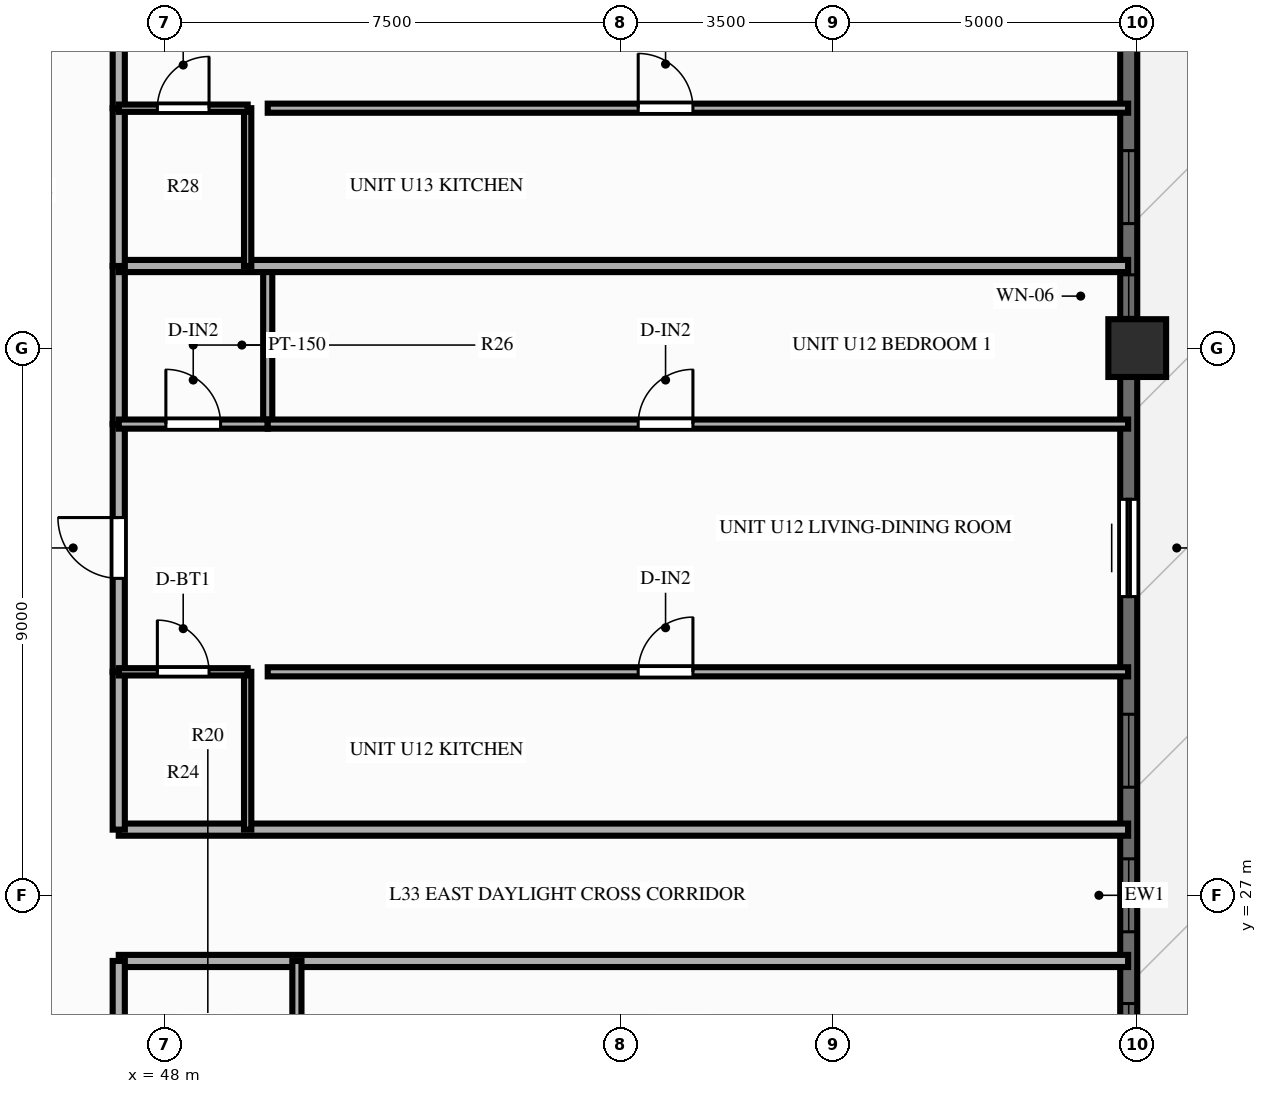
"""IFC4 building model, lengths in metres.
Left out: names, types, materials, properties, quantities, classifications, styles, units other than length and angle.
Written with IfcOpenShell. Run it as: python <this file> out.ifc"""

import sys

from ifc_helpers import new_model, si_unit, direction, frame, frame_2d, origin, origin_2d, place, context, subcontext, project, spatial, rectangle, extrude, source, transform, mapped, element, fill, save


model = new_model("IFC4")
c1 = context("Model", 3, precision=1e-05, world=origin(), true_north=direction((0.0, 1.0)))
c2 = subcontext(c1, "Body", "Model", "MODEL_VIEW")
j1 = project(units=[si_unit("LENGTHUNIT", "METRE"), si_unit("PLANEANGLEUNIT", "RADIAN")], contexts=[c1])
p1 = place(None, origin())
s1 = spatial("IfcSite", under=j1, at=p1, CompositionType="ELEMENT")
p2 = place(p1, origin())
s2 = spatial("IfcBuilding", under=s1, at=p2, CompositionType="ELEMENT")
p3 = place(p2, frame((0.0, 0.0, 104.85)))
s3 = spatial("IfcBuildingStorey", under=s2, at=p3, CompositionType="ELEMENT", Elevation=104.85)
m1 = source(origin(), c2, "Body", "SweptSolid", [
    extrude(rectangle(XDim=0.95, YDim=0.95, at=origin_2d()), origin(), (0.0, 0.0, 1.0), 3.0),
])
p4 = place(p3, frame((64.0, 36.0, 0.0), z_axis=(0.0, 0.0, 1.0), x_axis=(1.0, 0.0, 0.0)))
e1 = element("IfcColumn", 1, at=p4, inside=s3, PredefinedType="COLUMN", context=c2, shape_type="MappedRepresentation", body=[
    mapped(m1, transform((0.0, 0.0, 0.0), scale=1.0)),
])
p5 = place(p3, frame((63.86, 7.2, 0.0), z_axis=(0.0, 0.0, 1.0), x_axis=(0.0, 1.0, 0.0)))
e2 = element("IfcWall", 2, at=p5, inside=s3, PredefinedType="SOLIDWALL", context=c2, shape_type="SweptSolid", body=[
    extrude(rectangle(XDim=39.6, YDim=0.28, at=frame_2d((19.8, 0.0))), origin(), (0.0, 0.0, 1.0), 2.28),
])
p6 = place(p5, frame((0.945, 0.0, 0.25)))
e3 = element("IfcOpeningElement", 3, at=p6, cuts=e2, PredefinedType="OPENING", context=c2, shape_type="SweptSolid", body=[
    extrude(rectangle(XDim=1.2, YDim=1.5, at=frame_2d((0.6, 0.75))), frame((0.0, 0.152, 0.0), z_axis=(0.0, -1.0, 0.0), x_axis=(1.0, 0.0, 0.0)), (0.0, 0.0, 1.0), 0.304),
])
p7 = place(p5, frame((4.213, 0.0, 0.25)))
e4 = element("IfcOpeningElement", 4, at=p7, cuts=e2, PredefinedType="OPENING", context=c2, shape_type="SweptSolid", body=[
    extrude(rectangle(XDim=1.2, YDim=1.5, at=frame_2d((0.6, 0.75))), frame((0.0, 0.152, 0.0), z_axis=(0.0, -1.0, 0.0), x_axis=(1.0, 0.0, 0.0)), (0.0, 0.0, 1.0), 0.304),
])
p8 = place(p5, frame((7.55, 0.0, 0.25)))
e5 = element("IfcOpeningElement", 5, at=p8, cuts=e2, PredefinedType="OPENING", context=c2, shape_type="SweptSolid", body=[
    extrude(rectangle(XDim=1.2, YDim=1.5, at=frame_2d((0.6, 0.75))), frame((0.0, 0.152, 0.0), z_axis=(0.0, -1.0, 0.0), x_axis=(1.0, 0.0, 0.0)), (0.0, 0.0, 1.0), 0.304),
])
p9 = place(p5, frame((13.483, 0.0, 0.25)))
e6 = element("IfcOpeningElement", 6, at=p9, cuts=e2, PredefinedType="OPENING", context=c2, shape_type="SweptSolid", body=[
    extrude(rectangle(XDim=1.2, YDim=1.5, at=frame_2d((0.6, 0.75))), frame((0.0, 0.152, 0.0), z_axis=(0.0, -1.0, 0.0), x_axis=(1.0, 0.0, 0.0)), (0.0, 0.0, 1.0), 0.304),
])
p10 = place(p5, frame((16.82, 0.0, 0.25)))
e7 = element("IfcOpeningElement", 7, at=p10, cuts=e2, PredefinedType="OPENING", context=c2, shape_type="SweptSolid", body=[
    extrude(rectangle(XDim=1.2, YDim=1.5, at=frame_2d((0.6, 0.75))), frame((0.0, 0.152, 0.0), z_axis=(0.0, -1.0, 0.0), x_axis=(1.0, 0.0, 0.0)), (0.0, 0.0, 1.0), 0.304),
])
p11 = place(p5, frame((19.2, 0.0, 0.25)))
e8 = element("IfcOpeningElement", 8, at=p11, cuts=e2, PredefinedType="OPENING", context=c2, shape_type="SweptSolid", body=[
    extrude(rectangle(XDim=1.2, YDim=1.5, at=frame_2d((0.6, 0.75))), frame((0.0, 0.152, 0.0), z_axis=(0.0, -1.0, 0.0), x_axis=(1.0, 0.0, 0.0)), (0.0, 0.0, 1.0), 0.304),
])
p12 = place(p5, frame((21.578, 0.0, 0.25)))
e9 = element("IfcOpeningElement", 9, at=p12, cuts=e2, PredefinedType="OPENING", context=c2, shape_type="SweptSolid", body=[
    extrude(rectangle(XDim=1.2, YDim=1.5, at=frame_2d((0.6, 0.75))), frame((0.0, 0.152, 0.0), z_axis=(0.0, -1.0, 0.0), x_axis=(1.0, 0.0, 0.0)), (0.0, 0.0, 1.0), 0.304),
])
p13 = place(p5, frame((26.313, 0.0, 0.0), z_axis=(0.0, 0.0, 1.0), x_axis=(-1.0, 0.0, 0.0)))
e10 = element("IfcOpeningElement", 10, at=p13, cuts=e2, PredefinedType="OPENING", context=c2, shape_type="SweptSolid", body=[
    extrude(rectangle(XDim=1.6, YDim=2.15, at=frame_2d((0.8, 1.075))), frame((0.0, 0.152, 0.0), z_axis=(0.0, -1.0, 0.0), x_axis=(1.0, 0.0, 0.0)), (0.0, 0.0, 1.0), 0.304),
])
p14 = place(p5, frame((29.305, 0.0, 0.25)))
e11 = element("IfcOpeningElement", 11, at=p14, cuts=e2, PredefinedType="OPENING", context=c2, shape_type="SweptSolid", body=[
    extrude(rectangle(XDim=0.7, YDim=1.5, at=frame_2d((0.35, 0.75))), frame((0.0, 0.152, 0.0), z_axis=(0.0, -1.0, 0.0), x_axis=(1.0, 0.0, 0.0)), (0.0, 0.0, 1.0), 0.304),
])
p15 = place(p5, frame((30.848, 0.0, 0.25)))
e12 = element("IfcOpeningElement", 12, at=p15, cuts=e2, PredefinedType="OPENING", context=c2, shape_type="SweptSolid", body=[
    extrude(rectangle(XDim=1.2, YDim=1.5, at=frame_2d((0.6, 0.75))), frame((0.0, 0.152, 0.0), z_axis=(0.0, -1.0, 0.0), x_axis=(1.0, 0.0, 0.0)), (0.0, 0.0, 1.0), 0.304),
])
p16 = place(p5, frame((34.183, 0.0, 0.25)))
e13 = element("IfcOpeningElement", 13, at=p16, cuts=e2, PredefinedType="OPENING", context=c2, shape_type="SweptSolid", body=[
    extrude(rectangle(XDim=1.2, YDim=1.5, at=frame_2d((0.6, 0.75))), frame((0.0, 0.152, 0.0), z_axis=(0.0, -1.0, 0.0), x_axis=(1.0, 0.0, 0.0)), (0.0, 0.0, 1.0), 0.304),
])
p17 = place(p5, frame((37.452, 0.0, 0.25)))
e14 = element("IfcOpeningElement", 14, at=p17, cuts=e2, PredefinedType="OPENING", context=c2, shape_type="SweptSolid", body=[
    extrude(rectangle(XDim=1.2, YDim=1.5, at=frame_2d((0.6, 0.75))), frame((0.0, 0.152, 0.0), z_axis=(0.0, -1.0, 0.0), x_axis=(1.0, 0.0, 0.0)), (0.0, 0.0, 1.0), 0.304),
])
p18 = place(p3, frame((47.25, 25.92, 0.0), z_axis=(0.0, 0.0, 1.0), x_axis=(1.0, 0.0, 0.0)))
e15 = element("IfcWall", 15, at=p18, inside=s3, PredefinedType="PARTITIONING", context=c2, shape_type="SweptSolid", body=[
    extrude(rectangle(XDim=16.6, YDim=0.2, at=frame_2d((8.3, 0.0))), origin(), (0.0, 0.0, 1.0), 2.79),
])
p19 = place(p3, frame((47.25, 23.32, 0.0), z_axis=(0.0, 0.0, 1.0), x_axis=(0.0, 1.0, 0.0)))
e16 = element("IfcWall", 16, at=p19, inside=s3, PredefinedType="PARTITIONING", context=c2, shape_type="SweptSolid", body=[
    extrude(rectangle(XDim=2.6, YDim=0.2, at=frame_2d((1.3, 0.0))), origin(), (0.0, 0.0, 1.0), 2.79),
])
p20 = place(p3, frame((50.18, 23.32, 0.0), z_axis=(0.0, 0.0, 1.0), x_axis=(0.0, 1.0, 0.0)))
e17 = element("IfcWall", 17, at=p20, inside=s3, PredefinedType="PARTITIONING", context=c2, shape_type="SweptSolid", body=[
    extrude(rectangle(XDim=2.6, YDim=0.15, at=frame_2d((1.3, 0.0))), origin(), (0.0, 0.0, 1.0), 2.79),
])
p21 = place(p3, frame((47.25, 28.08, 0.0), z_axis=(0.0, 0.0, 1.0), x_axis=(1.0, 0.0, 0.0)))
e18 = element("IfcWall", 18, at=p21, inside=s3, PredefinedType="PARTITIONING", context=c2, shape_type="SweptSolid", body=[
    extrude(rectangle(XDim=16.6, YDim=0.2, at=frame_2d((8.3, 0.0))), origin(), (0.0, 0.0, 1.0), 2.79),
])
p22 = place(p3, frame((47.25, 28.08, 0.0), z_axis=(0.0, 0.0, 1.0), x_axis=(0.0, 1.0, 0.0)))
e19 = element("IfcWall", 19, at=p22, inside=s3, PredefinedType="PARTITIONING", context=c2, shape_type="SweptSolid", body=[
    extrude(rectangle(XDim=2.595, YDim=0.2, at=frame_2d((1.298, 0.0))), origin(), (0.0, 0.0, 1.0), 2.79),
])
p23 = place(p3, frame((47.25, 30.676, 0.0), z_axis=(0.0, 0.0, 1.0), x_axis=(0.0, 1.0, 0.0)))
e20 = element("IfcWall", 20, at=p23, inside=s3, PredefinedType="PARTITIONING", context=c2, shape_type="SweptSolid", body=[
    extrude(rectangle(XDim=4.074, YDim=0.2, at=frame_2d((2.037, 0.0))), origin(), (0.0, 0.0, 1.0), 2.79),
])
p24 = place(p23, frame((1.537, 0.0, 0.0)))
e21 = element("IfcOpeningElement", 21, at=p24, cuts=e20, PredefinedType="OPENING", context=c2, shape_type="SweptSolid", body=[
    extrude(rectangle(XDim=1.0, YDim=2.15, at=frame_2d((0.5, 1.075))), frame((0.0, 0.112, 0.0), z_axis=(0.0, -1.0, 0.0), x_axis=(1.0, 0.0, 0.0)), (0.0, 0.0, 1.0), 0.224),
])
p25 = place(p3, frame((47.25, 34.75, 0.0), z_axis=(0.0, 0.0, 1.0), x_axis=(0.0, 1.0, 0.0)))
e22 = element("IfcWall", 22, at=p25, inside=s3, PredefinedType="PARTITIONING", context=c2, shape_type="SweptSolid", body=[
    extrude(rectangle(XDim=2.6, YDim=0.2, at=frame_2d((1.3, 0.0))), origin(), (0.0, 0.0, 1.0), 2.79),
])
p26 = place(p3, frame((49.37, 28.08, 0.0), z_axis=(0.0, 0.0, 1.0), x_axis=(0.0, 1.0, 0.0)))
e23 = element("IfcWall", 23, at=p26, inside=s3, PredefinedType="PARTITIONING", context=c2, shape_type="SweptSolid", body=[
    extrude(rectangle(XDim=2.595, YDim=0.12, at=frame_2d((1.298, 0.0))), origin(), (0.0, 0.0, 1.0), 2.79),
])
p27 = place(p3, frame((49.7, 34.75, 0.0), z_axis=(0.0, 0.0, 1.0), x_axis=(0.0, 1.0, 0.0)))
e24 = element("IfcWall", 24, at=p27, inside=s3, PredefinedType="PARTITIONING", context=c2, shape_type="SweptSolid", body=[
    extrude(rectangle(XDim=2.6, YDim=0.15, at=frame_2d((1.3, 0.0))), origin(), (0.0, 0.0, 1.0), 2.79),
])
p28 = place(p3, frame((47.25, 30.676, 0.0), z_axis=(0.0, 0.0, 1.0), x_axis=(1.0, 0.0, 0.0)))
e25 = element("IfcWall", 25, at=p28, inside=s3, PredefinedType="PARTITIONING", context=c2, shape_type="SweptSolid", body=[
    extrude(rectangle(XDim=2.12, YDim=0.12, at=frame_2d((1.06, 0.0))), origin(), (0.0, 0.0, 1.0), 2.79),
])
p29 = place(p28, frame((0.635, 0.0, 0.0)))
e26 = element("IfcOpeningElement", 26, at=p29, cuts=e25, PredefinedType="OPENING", context=c2, shape_type="SweptSolid", body=[
    extrude(rectangle(XDim=0.85, YDim=2.05, at=frame_2d((0.425, 1.025))), frame((0.0, 0.072, 0.0), z_axis=(0.0, -1.0, 0.0), x_axis=(1.0, 0.0, 0.0)), (0.0, 0.0, 1.0), 0.144),
])
p30 = place(p3, frame((49.7, 30.676, 0.0), z_axis=(0.0, 0.0, 1.0), x_axis=(1.0, 0.0, 0.0)))
e27 = element("IfcWall", 27, at=p30, inside=s3, PredefinedType="PARTITIONING", context=c2, shape_type="SweptSolid", body=[
    extrude(rectangle(XDim=14.15, YDim=0.15, at=frame_2d((7.075, 0.0))), origin(), (0.0, 0.0, 1.0), 2.79),
])
p31 = place(p30, frame((6.093, 0.0, 0.0)))
e28 = element("IfcOpeningElement", 28, at=p31, cuts=e27, PredefinedType="OPENING", context=c2, shape_type="SweptSolid", body=[
    extrude(rectangle(XDim=0.9, YDim=2.1, at=frame_2d((0.45, 1.05))), frame((0.0, 0.087, 0.0), z_axis=(0.0, -1.0, 0.0), x_axis=(1.0, 0.0, 0.0)), (0.0, 0.0, 1.0), 0.174),
])
p32 = place(p3, frame((47.25, 34.75, 0.0), z_axis=(0.0, 0.0, 1.0), x_axis=(1.0, 0.0, 0.0)))
e29 = element("IfcWall", 29, at=p32, inside=s3, PredefinedType="PARTITIONING", context=c2, shape_type="SweptSolid", body=[
    extrude(rectangle(XDim=2.45, YDim=0.15, at=frame_2d((1.225, 0.0))), origin(), (0.0, 0.0, 1.0), 2.79),
])
p33 = place(p32, frame((0.775, 0.0, 0.0)))
e30 = element("IfcOpeningElement", 30, at=p33, cuts=e29, PredefinedType="OPENING", context=c2, shape_type="SweptSolid", body=[
    extrude(rectangle(XDim=0.9, YDim=2.1, at=frame_2d((0.45, 1.05))), frame((0.0, 0.087, 0.0), z_axis=(0.0, -1.0, 0.0), x_axis=(1.0, 0.0, 0.0)), (0.0, 0.0, 1.0), 0.174),
])
p34 = place(p3, frame((49.7, 34.75, 0.0), z_axis=(0.0, 0.0, 1.0), x_axis=(1.0, 0.0, 0.0)))
e31 = element("IfcWall", 31, at=p34, inside=s3, PredefinedType="PARTITIONING", context=c2, shape_type="SweptSolid", body=[
    extrude(rectangle(XDim=14.15, YDim=0.15, at=frame_2d((7.075, 0.0))), origin(), (0.0, 0.0, 1.0), 2.79),
])
p35 = place(p34, frame((6.093, 0.0, 0.0)))
e32 = element("IfcOpeningElement", 32, at=p35, cuts=e31, PredefinedType="OPENING", context=c2, shape_type="SweptSolid", body=[
    extrude(rectangle(XDim=0.9, YDim=2.1, at=frame_2d((0.45, 1.05))), frame((0.0, 0.087, 0.0), z_axis=(0.0, -1.0, 0.0), x_axis=(1.0, 0.0, 0.0)), (0.0, 0.0, 1.0), 0.174),
])
p36 = place(p3, frame((47.25, 37.35, 0.0), z_axis=(0.0, 0.0, 1.0), x_axis=(1.0, 0.0, 0.0)))
e33 = element("IfcWall", 33, at=p36, inside=s3, PredefinedType="PARTITIONING", context=c2, shape_type="SweptSolid", body=[
    extrude(rectangle(XDim=16.6, YDim=0.2, at=frame_2d((8.3, 0.0))), origin(), (0.0, 0.0, 1.0), 2.79),
])
p37 = place(p3, frame((47.25, 37.35, 0.0), z_axis=(0.0, 0.0, 1.0), x_axis=(0.0, 1.0, 0.0)))
e34 = element("IfcWall", 34, at=p37, inside=s3, PredefinedType="PARTITIONING", context=c2, shape_type="SweptSolid", body=[
    extrude(rectangle(XDim=2.595, YDim=0.2, at=frame_2d((1.298, 0.0))), origin(), (0.0, 0.0, 1.0), 2.79),
])
p38 = place(p3, frame((47.25, 39.946, 0.0), z_axis=(0.0, 0.0, 1.0), x_axis=(0.0, 1.0, 0.0)))
e35 = element("IfcWall", 35, at=p38, inside=s3, PredefinedType="PARTITIONING", context=c2, shape_type="SweptSolid", body=[
    extrude(rectangle(XDim=4.074, YDim=0.2, at=frame_2d((2.037, 0.0))), origin(), (0.0, 0.0, 1.0), 2.79),
])
p39 = place(p38, frame((1.537, 0.0, 0.0)))
e36 = element("IfcOpeningElement", 36, at=p39, cuts=e35, PredefinedType="OPENING", context=c2, shape_type="SweptSolid", body=[
    extrude(rectangle(XDim=1.0, YDim=2.15, at=frame_2d((0.5, 1.075))), frame((0.0, 0.112, 0.0), z_axis=(0.0, -1.0, 0.0), x_axis=(1.0, 0.0, 0.0)), (0.0, 0.0, 1.0), 0.224),
])
p40 = place(p3, frame((49.37, 37.35, 0.0), z_axis=(0.0, 0.0, 1.0), x_axis=(0.0, 1.0, 0.0)))
e37 = element("IfcWall", 37, at=p40, inside=s3, PredefinedType="PARTITIONING", context=c2, shape_type="SweptSolid", body=[
    extrude(rectangle(XDim=2.595, YDim=0.12, at=frame_2d((1.298, 0.0))), origin(), (0.0, 0.0, 1.0), 2.79),
])
p41 = place(p3, frame((47.25, 39.946, 0.0), z_axis=(0.0, 0.0, 1.0), x_axis=(1.0, 0.0, 0.0)))
e38 = element("IfcWall", 38, at=p41, inside=s3, PredefinedType="PARTITIONING", context=c2, shape_type="SweptSolid", body=[
    extrude(rectangle(XDim=2.12, YDim=0.12, at=frame_2d((1.06, 0.0))), origin(), (0.0, 0.0, 1.0), 2.79),
])
p42 = place(p41, frame((0.635, 0.0, 0.0)))
e39 = element("IfcOpeningElement", 39, at=p42, cuts=e38, PredefinedType="OPENING", context=c2, shape_type="SweptSolid", body=[
    extrude(rectangle(XDim=0.85, YDim=2.05, at=frame_2d((0.425, 1.025))), frame((0.0, 0.072, 0.0), z_axis=(0.0, -1.0, 0.0), x_axis=(1.0, 0.0, 0.0)), (0.0, 0.0, 1.0), 0.144),
])
p43 = place(p3, frame((49.7, 39.946, 0.0), z_axis=(0.0, 0.0, 1.0), x_axis=(1.0, 0.0, 0.0)))
e40 = element("IfcWall", 40, at=p43, inside=s3, PredefinedType="PARTITIONING", context=c2, shape_type="SweptSolid", body=[
    extrude(rectangle(XDim=14.15, YDim=0.15, at=frame_2d((7.075, 0.0))), origin(), (0.0, 0.0, 1.0), 2.79),
])
p44 = place(p43, frame((6.093, 0.0, 0.0)))
e41 = element("IfcOpeningElement", 41, at=p44, cuts=e40, PredefinedType="OPENING", context=c2, shape_type="SweptSolid", body=[
    extrude(rectangle(XDim=0.9, YDim=2.1, at=frame_2d((0.45, 1.05))), frame((0.0, 0.087, 0.0), z_axis=(0.0, -1.0, 0.0), x_axis=(1.0, 0.0, 0.0)), (0.0, 0.0, 1.0), 0.174),
])
m2 = source(origin(), c2, "Body", "SweptSolid", [
    extrude(rectangle(XDim=1.2, YDim=1.5, at=frame_2d((0.6, 0.75))), frame((0.0, 0.03, 0.0), z_axis=(0.0, -1.0, 0.0), x_axis=(1.0, 0.0, 0.0)), (0.0, 0.0, 1.0), 0.06),
])
p45 = place(p10, origin())
e42 = element("IfcWindow", 42, at=p45, inside=s3, PartitioningType="SINGLE_PANEL", PredefinedType="WINDOW", context=c2, shape_type="MappedRepresentation", body=[
    mapped(m2, transform((0.0, 0.0, 0.0), scale=1.0)),
])
fill(e7, e42)
p46 = place(p11, origin())
e43 = element("IfcWindow", 43, at=p46, inside=s3, PartitioningType="SINGLE_PANEL", PredefinedType="WINDOW", context=c2, shape_type="MappedRepresentation", body=[
    mapped(m2, transform((0.0, 0.0, 0.0), scale=1.0)),
])
fill(e8, e43)
p47 = place(p12, origin())
e44 = element("IfcWindow", 44, at=p47, inside=s3, PartitioningType="SINGLE_PANEL", PredefinedType="WINDOW", context=c2, shape_type="MappedRepresentation", body=[
    mapped(m2, transform((0.0, 0.0, 0.0), scale=1.0)),
])
fill(e9, e44)
m3 = source(origin(), c2, "Body", "SweptSolid", [
    extrude(rectangle(XDim=1.6, YDim=2.15, at=frame_2d((0.8, 1.075))), frame((0.0, 0.025, 0.0), z_axis=(0.0, -1.0, 0.0), x_axis=(1.0, 0.0, 0.0)), (0.0, 0.0, 1.0), 0.05),
])
p48 = place(p13, origin())
e45 = element("IfcDoor", 45, at=p48, inside=s3, OperationType="SLIDING_TO_LEFT", PredefinedType="DOOR", context=c2, shape_type="MappedRepresentation", body=[
    mapped(m3, transform((0.0, 0.0, 0.0), scale=1.0)),
])
fill(e10, e45)
m4 = source(origin(), c2, "Body", "SweptSolid", [
    extrude(rectangle(XDim=0.7, YDim=1.5, at=frame_2d((0.35, 0.75))), frame((0.0, 0.03, 0.0), z_axis=(0.0, -1.0, 0.0), x_axis=(1.0, 0.0, 0.0)), (0.0, 0.0, 1.0), 0.06),
])
p49 = place(p14, origin())
e46 = element("IfcWindow", 46, at=p49, inside=s3, PartitioningType="SINGLE_PANEL", PredefinedType="WINDOW", context=c2, shape_type="MappedRepresentation", body=[
    mapped(m4, transform((0.0, 0.0, 0.0), scale=1.0)),
])
fill(e11, e46)
p50 = place(p15, origin())
e47 = element("IfcWindow", 47, at=p50, inside=s3, PartitioningType="SINGLE_PANEL", PredefinedType="WINDOW", context=c2, shape_type="MappedRepresentation", body=[
    mapped(m2, transform((0.0, 0.0, 0.0), scale=1.0)),
])
fill(e12, e47)
m5 = source(origin(), c2, "Body", "SweptSolid", [
    extrude(rectangle(XDim=1.0, YDim=2.15, at=frame_2d((0.5, 1.075))), frame((0.0, 0.025, 0.0), z_axis=(0.0, -1.0, 0.0), x_axis=(1.0, 0.0, 0.0)), (0.0, 0.0, 1.0), 0.05),
])
p51 = place(p24, origin())
e48 = element("IfcDoor", 48, at=p51, inside=s3, OperationType="SINGLE_SWING_RIGHT", PredefinedType="DOOR", context=c2, shape_type="MappedRepresentation", body=[
    mapped(m5, transform((0.0, 0.0, 0.0), scale=1.0)),
])
fill(e21, e48)
m6 = source(origin(), c2, "Body", "SweptSolid", [
    extrude(rectangle(XDim=0.85, YDim=2.05, at=frame_2d((0.425, 1.025))), frame((0.0, 0.025, 0.0), z_axis=(0.0, -1.0, 0.0), x_axis=(1.0, 0.0, 0.0)), (0.0, 0.0, 1.0), 0.05),
])
p52 = place(p29, origin())
e49 = element("IfcDoor", 49, at=p52, inside=s3, OperationType="SINGLE_SWING_LEFT", PredefinedType="DOOR", context=c2, shape_type="MappedRepresentation", body=[
    mapped(m6, transform((0.0, 0.0, 0.0), scale=1.0)),
])
fill(e26, e49)
m7 = source(origin(), c2, "Body", "SweptSolid", [
    extrude(rectangle(XDim=0.9, YDim=2.1, at=frame_2d((0.45, 1.05))), frame((0.0, 0.025, 0.0), z_axis=(0.0, -1.0, 0.0), x_axis=(1.0, 0.0, 0.0)), (0.0, 0.0, 1.0), 0.05),
])
p53 = place(p31, origin())
e50 = element("IfcDoor", 50, at=p53, inside=s3, OperationType="SINGLE_SWING_RIGHT", PredefinedType="DOOR", context=c2, shape_type="MappedRepresentation", body=[
    mapped(m7, transform((0.0, 0.0, 0.0), scale=1.0)),
])
fill(e28, e50)
p54 = place(p33, origin())
e51 = element("IfcDoor", 51, at=p54, inside=s3, OperationType="SINGLE_SWING_LEFT", PredefinedType="DOOR", context=c2, shape_type="MappedRepresentation", body=[
    mapped(m7, transform((0.0, 0.0, 0.0), scale=1.0)),
])
fill(e30, e51)
p55 = place(p35, origin())
e52 = element("IfcDoor", 52, at=p55, inside=s3, OperationType="SINGLE_SWING_RIGHT", PredefinedType="DOOR", context=c2, shape_type="MappedRepresentation", body=[
    mapped(m7, transform((0.0, 0.0, 0.0), scale=1.0)),
])
fill(e32, e52)
p56 = place(p42, origin())
e53 = element("IfcDoor", 53, at=p56, inside=s3, OperationType="SINGLE_SWING_RIGHT", PredefinedType="DOOR", context=c2, shape_type="MappedRepresentation", body=[
    mapped(m6, transform((0.0, 0.0, 0.0), scale=1.0)),
])
fill(e39, e53)
p57 = place(p44, origin())
e54 = element("IfcDoor", 54, at=p57, inside=s3, OperationType="SINGLE_SWING_LEFT", PredefinedType="DOOR", context=c2, shape_type="MappedRepresentation", body=[
    mapped(m7, transform((0.0, 0.0, 0.0), scale=1.0)),
])
fill(e41, e54)
save(model, sys.argv[1])
